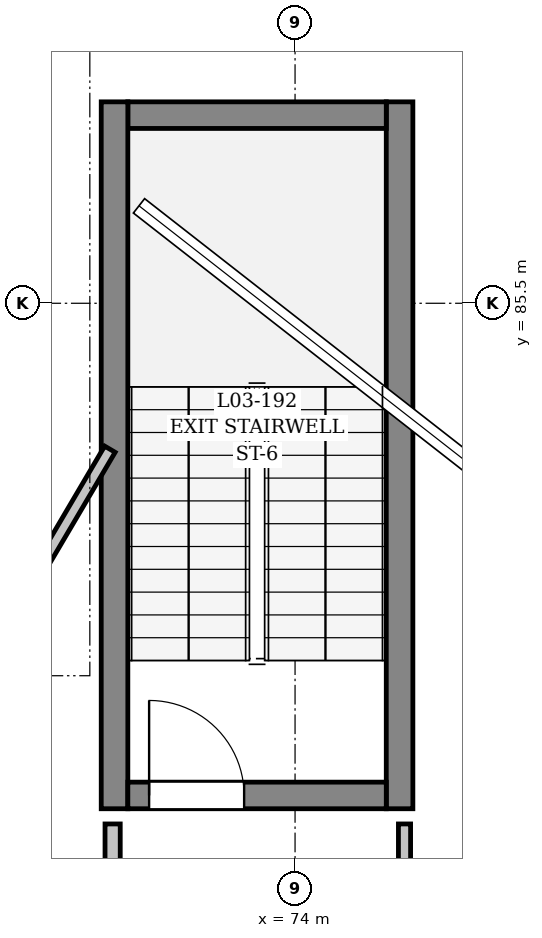
"""IFC4 building model, lengths in metres.
Left out: names, types, materials, properties, quantities, classifications, styles, units other than length and angle.
Written with IfcOpenShell. Run it as: python <this file> out.ifc"""

import sys

from ifc_helpers import new_model, si_unit, direction, frame, frame_2d, origin, place, context, subcontext, project, spatial, rectangle, extrude, element, fill, save


model = new_model("IFC4")
c1 = context("Model", 3, precision=1e-05, world=origin(), true_north=direction((0.0, 1.0)))
c2 = subcontext(c1, "Body", "Model", "MODEL_VIEW")
j1 = project(units=[si_unit("LENGTHUNIT", "METRE"), si_unit("PLANEANGLEUNIT", "RADIAN")], contexts=[c1])
p1 = place(None, origin())
s1 = spatial("IfcSite", under=j1, at=p1, CompositionType="ELEMENT")
p2 = place(p1, origin())
s2 = spatial("IfcBuilding", under=s1, at=p2, CompositionType="ELEMENT")
p3 = place(p2, frame((0.0, 0.0, 10.2)))
s3 = spatial("IfcBuildingStorey", under=s2, at=p3, CompositionType="ELEMENT", Elevation=10.2)
p4 = place(p3, frame((75.375, 78.85, 0.0), z_axis=(0.0, 0.0, 1.0), x_axis=(0.0, 1.0, 0.0)))
e1 = element("IfcWall", 1, at=p4, inside=s3, PredefinedType="SHEAR", context=c2, shape_type="SweptSolid", body=[
    extrude(rectangle(XDim=9.3, YDim=0.35, at=frame_2d((4.65, 0.0))), origin(), (0.0, 0.0, 1.0), 4.52),
])
p5 = place(p3, frame((75.2, 87.975, 0.0), z_axis=(0.0, 0.0, 1.0), x_axis=(-1.0, 0.0, 0.0)))
e2 = element("IfcWall", 2, at=p5, inside=s3, PredefinedType="SHEAR", context=c2, shape_type="SweptSolid", body=[
    extrude(rectangle(XDim=3.4, YDim=0.35, at=frame_2d((1.7, 0.0))), origin(), (0.0, 0.0, 1.0), 4.52),
])
p6 = place(p3, frame((71.625, 88.15, 0.0), z_axis=(0.0, 0.0, 1.0), x_axis=(0.0, -1.0, 0.0)))
e3 = element("IfcWall", 3, at=p6, inside=s3, PredefinedType="SHEAR", context=c2, shape_type="SweptSolid", body=[
    extrude(rectangle(XDim=9.3, YDim=0.35, at=frame_2d((4.65, 0.0))), origin(), (0.0, 0.0, 1.0), 4.52),
])
p7 = place(p3, frame((71.8, 79.025, 0.0), z_axis=(0.0, 0.0, 1.0), x_axis=(1.0, 0.0, 0.0)))
e4 = element("IfcWall", 4, at=p7, inside=s3, PredefinedType="SHEAR", context=c2, shape_type="SweptSolid", body=[
    extrude(rectangle(XDim=3.4, YDim=0.35, at=frame_2d((1.7, 0.0))), origin(), (0.0, 0.0, 1.0), 4.52),
])
p8 = place(p7, frame((0.28, 0.0, 0.0)))
e5 = element("IfcOpeningElement", 5, at=p8, cuts=e4, PredefinedType="OPENING", context=c2, shape_type="SweptSolid", body=[
    extrude(rectangle(XDim=1.25, YDim=2.2, at=frame_2d((0.625, 1.1))), frame((0.0, 0.185, 0.0), z_axis=(0.0, -1.0, 0.0), x_axis=(1.0, 0.0, 0.0)), (0.0, 0.0, 1.0), 0.37),
])
p9 = place(p3, frame((71.6, 78.65, 0.0), z_axis=(0.0, 0.0, 1.0), x_axis=(0.0, -1.0, 0.0)))
e6 = element("IfcWall", 6, at=p9, inside=s3, PredefinedType="PARTITIONING", context=c2, shape_type="SweptSolid", body=[
    extrude(rectangle(XDim=3.05, YDim=0.2, at=frame_2d((1.525, 0.0))), origin(), (0.0, 0.0, 1.0), 4.52),
])
p10 = place(p9, frame((0.9, 0.0, 0.0)))
e7 = element("IfcOpeningElement", 7, at=p10, cuts=e6, PredefinedType="OPENING", context=c2, shape_type="SweptSolid", body=[
    extrude(rectangle(XDim=1.25, YDim=2.2, at=frame_2d((0.625, 1.1))), frame((0.0, 0.11, 0.0), z_axis=(0.0, -1.0, 0.0), x_axis=(1.0, 0.0, 0.0)), (0.0, 0.0, 1.0), 0.22),
])
p11 = place(p3, frame((67.34, 76.41, 0.0), z_axis=(0.0, 0.0, 1.0), x_axis=(0.507554651223, 0.861619565714, 0.0)))
e8 = element("IfcWall", 8, at=p11, inside=s3, PredefinedType="PARTITIONING", context=c2, shape_type="SweptSolid", body=[
    extrude(rectangle(XDim=8.322, YDim=0.16, at=frame_2d((4.161, 0.0))), origin(), (0.0, 0.0, 1.0), 3.91),
])
p12 = place(p3, frame((75.44, 78.65, 0.0), z_axis=(0.0, 0.0, 1.0), x_axis=(0.0, -1.0, 0.0)))
e9 = element("IfcWall", 9, at=p12, inside=s3, PredefinedType="PARTITIONING", context=c2, shape_type="SweptSolid", body=[
    extrude(rectangle(XDim=3.09, YDim=0.16, at=frame_2d((1.545, 0.0))), origin(), (0.0, 0.0, 1.0), 3.51),
])
p13 = place(p12, frame((0.995, 0.0, 0.0)))
e10 = element("IfcOpeningElement", 10, at=p13, cuts=e9, PredefinedType="OPENING", context=c2, shape_type="SweptSolid", body=[
    extrude(rectangle(XDim=1.1, YDim=2.2, at=frame_2d((0.55, 1.1))), frame((0.0, 0.09, 0.0), z_axis=(0.0, -1.0, 0.0), x_axis=(1.0, 0.0, 0.0)), (0.0, 0.0, 1.0), 0.18),
])
p14 = place(p8, origin())
e11 = element("IfcDoor", 11, at=p14, inside=s3, OperationType="SINGLE_SWING_RIGHT", PredefinedType="DOOR", context=c2, shape_type="SweptSolid", body=[
    extrude(rectangle(XDim=1.25, YDim=2.2, at=frame_2d((0.625, 1.1))), frame((0.0, 0.025, 0.0), z_axis=(0.0, -1.0, 0.0), x_axis=(1.0, 0.0, 0.0)), (0.0, 0.0, 1.0), 0.05),
])
fill(e5, e11)
save(model, sys.argv[1])
